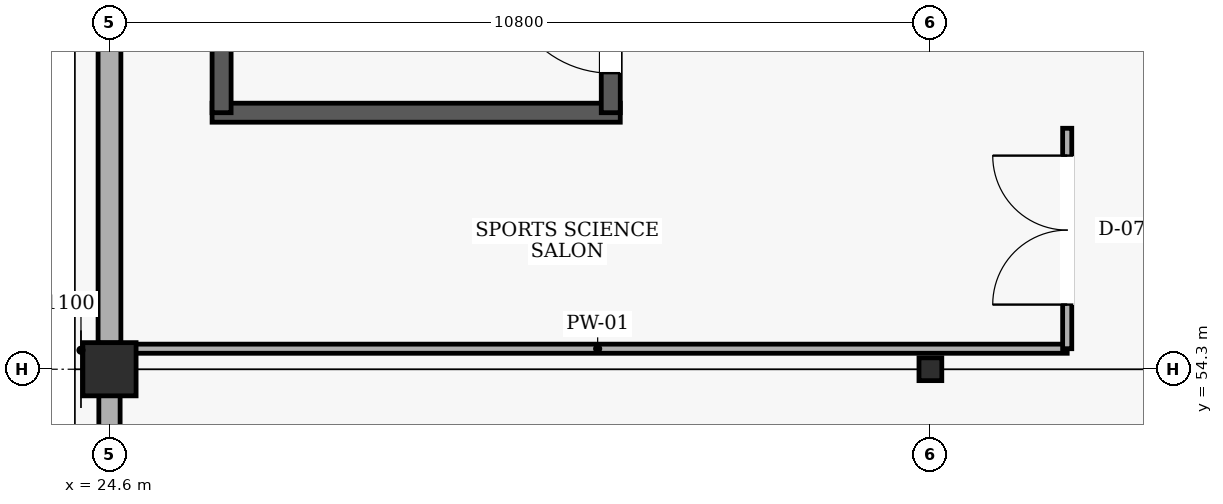
"""IFC4 building model, lengths in metres.
Left out: names, types, materials, properties, quantities, classifications, styles, units other than length and angle.
Written with IfcOpenShell. Run it as: python <this file> out.ifc"""

import sys

from ifc_helpers import new_model, si_unit, direction, frame, frame_2d, origin, origin_2d, place, context, subcontext, project, spatial, rectangle, hollow_rectangle, extrude, element, fill, save


model = new_model("IFC4")
c1 = context("Model", 3, precision=1e-05, world=origin(), true_north=direction((0.0, 1.0)))
c2 = subcontext(c1, "Body", "Model", "MODEL_VIEW")
j1 = project(units=[si_unit("LENGTHUNIT", "METRE"), si_unit("PLANEANGLEUNIT", "RADIAN")], contexts=[c1])
p1 = place(None, origin())
s1 = spatial("IfcSite", under=j1, at=p1, CompositionType="ELEMENT")
p2 = place(p1, origin())
s2 = spatial("IfcBuilding", under=s1, at=p2, CompositionType="ELEMENT")
p3 = place(p2, frame((0.0, 0.0, 24.6)))
s3 = spatial("IfcBuildingStorey", under=s2, at=p3, CompositionType="ELEMENT", Elevation=24.6)
p4 = place(p3, frame((24.6, 54.3, 0.0), z_axis=(0.0, 0.0, 1.0), x_axis=(1.0, 0.0, 0.0)))
e1 = element("IfcColumn", 1, at=p4, inside=s3, PredefinedType="COLUMN", context=c2, shape_type="SweptSolid", body=[
    extrude(rectangle(XDim=0.7, YDim=0.7, at=origin_2d()), origin(), (0.0, 0.0, 1.0), 4.8),
])
p5 = place(p3, frame((35.4, 54.3, 0.0), z_axis=(0.0, 0.0, 1.0), x_axis=(1.0, 0.0, 0.0)))
e2 = element("IfcColumn", 2, at=p5, inside=s3, PredefinedType="COLUMN", context=c2, shape_type="SweptSolid", body=[
    extrude(hollow_rectangle(XDim=0.3, YDim=0.3, WallThickness=0.016, at=origin_2d()), origin(), (0.0, 0.0, 1.0), 4.8),
])
p6 = place(p3, frame((24.6, 47.445, 0.0), z_axis=(0.0, 0.0, 1.0), x_axis=(0.0, 1.0, 0.0)))
e3 = element("IfcWall", 3, at=p6, inside=s3, PredefinedType="SOLIDWALL", context=c2, shape_type="SweptSolid", body=[
    extrude(rectangle(XDim=6.51, YDim=0.28, at=frame_2d((3.255, 0.0))), origin(), (0.0, 0.0, 1.0), 3.88),
])
p7 = place(p6, frame((2.255, 0.0, 0.9)))
e4 = element("IfcOpeningElement", 4, at=p7, cuts=e3, PredefinedType="OPENING", context=c2, shape_type="SweptSolid", body=[
    extrude(rectangle(XDim=2.0, YDim=1.5, at=frame_2d((1.0, 0.75))), frame((0.0, 0.15, 0.0), z_axis=(0.0, -1.0, 0.0), x_axis=(1.0, 0.0, 0.0)), (0.0, 0.0, 1.0), 0.3),
])
p8 = place(p3, frame((24.6, 54.645, 0.0), z_axis=(0.0, 0.0, 1.0), x_axis=(0.0, 1.0, 0.0)))
e5 = element("IfcWall", 5, at=p8, inside=s3, PredefinedType="SOLIDWALL", context=c2, shape_type="SweptSolid", body=[
    extrude(rectangle(XDim=13.71, YDim=0.3, at=frame_2d((6.855, 0.0))), origin(), (0.0, 0.0, 1.0), 3.58),
])
p9 = place(p8, frame((5.755, 0.0, 0.9)))
e6 = element("IfcOpeningElement", 6, at=p9, cuts=e5, PredefinedType="OPENING", context=c2, shape_type="SweptSolid", body=[
    extrude(rectangle(XDim=2.2, YDim=1.5, at=frame_2d((1.1, 0.75))), frame((0.0, 0.16, 0.0), z_axis=(0.0, -1.0, 0.0), x_axis=(1.0, 0.0, 0.0)), (0.0, 0.0, 1.0), 0.32),
])
p10 = place(p3, frame((25.95, 57.675, 0.0), z_axis=(0.0, 0.0, 1.0), x_axis=(1.0, 0.0, 0.0)))
e7 = element("IfcWall", 7, at=p10, inside=s3, PredefinedType="SHEAR", context=c2, shape_type="SweptSolid", body=[
    extrude(rectangle(XDim=5.37, YDim=0.25, at=frame_2d((2.685, 0.0))), origin(), (0.0, 0.0, 1.0), 4.5),
])
p11 = place(p3, frame((26.075, 57.675, 0.0), z_axis=(0.0, 0.0, 1.0), x_axis=(0.0, 1.0, 0.0)))
e8 = element("IfcWall", 8, at=p11, inside=s3, PredefinedType="SHEAR", context=c2, shape_type="SweptSolid", body=[
    extrude(rectangle(XDim=10.85, YDim=0.25, at=frame_2d((5.425, 0.0))), origin(), (0.0, 0.0, 1.0), 4.5),
])
p12 = place(p3, frame((31.195, 57.675, 0.0), z_axis=(0.0, 0.0, 1.0), x_axis=(0.0, 1.0, 0.0)))
e9 = element("IfcWall", 9, at=p12, inside=s3, PredefinedType="SHEAR", context=c2, shape_type="SweptSolid", body=[
    extrude(rectangle(XDim=10.85, YDim=0.25, at=frame_2d((5.425, 0.0))), origin(), (0.0, 0.0, 1.0), 4.5),
])
p13 = place(p12, frame((0.52, 0.0, 0.0)))
e10 = element("IfcOpeningElement", 10, at=p13, cuts=e9, PredefinedType="OPENING", context=c2, shape_type="SweptSolid", body=[
    extrude(rectangle(XDim=1.4, YDim=2.15, at=frame_2d((0.7, 1.075))), frame((0.0, 0.135, 0.0), z_axis=(0.0, -1.0, 0.0), x_axis=(1.0, 0.0, 0.0)), (0.0, 0.0, 1.0), 0.27),
])
p14 = place(p3, frame((24.845, 54.57, 0.0), z_axis=(0.0, 0.0, 1.0), x_axis=(1.0, 0.0, 0.0)))
e11 = element("IfcWall", 11, at=p14, inside=s3, PredefinedType="PARTITIONING", context=c2, shape_type="SweptSolid", body=[
    extrude(rectangle(XDim=12.355, YDim=0.12, at=frame_2d((6.177, 0.0))), origin(), (0.0, 0.0, 1.0), 3.78),
])
p15 = place(p3, frame((37.2, 54.57, 0.0), z_axis=(0.0, 0.0, 1.0), x_axis=(0.0, 1.0, 0.0)))
e12 = element("IfcWall", 12, at=p15, inside=s3, PredefinedType="PARTITIONING", context=c2, shape_type="SweptSolid", body=[
    extrude(rectangle(XDim=2.9, YDim=0.12, at=frame_2d((1.45, 0.0))), origin(), (0.0, 0.0, 1.0), 4.5),
])
p16 = place(p15, frame((0.58, 0.0, 0.0)))
e13 = element("IfcOpeningElement", 13, at=p16, cuts=e12, PredefinedType="OPENING", context=c2, shape_type="SweptSolid", body=[
    extrude(rectangle(XDim=1.96, YDim=2.3, at=frame_2d((0.98, 1.15))), frame((0.0, 0.07, 0.0), z_axis=(0.0, -1.0, 0.0), x_axis=(1.0, 0.0, 0.0)), (0.0, 0.0, 1.0), 0.14),
])
p17 = place(p13, origin())
e14 = element("IfcDoor", 14, at=p17, inside=s3, OperationType="SINGLE_SWING_RIGHT", PredefinedType="DOOR", context=c2, shape_type="SweptSolid", body=[
    extrude(rectangle(XDim=1.4, YDim=2.15, at=frame_2d((0.7, 1.075))), frame((0.0, 0.025, 0.0), z_axis=(0.0, -1.0, 0.0), x_axis=(1.0, 0.0, 0.0)), (0.0, 0.0, 1.0), 0.05),
])
fill(e10, e14)
p18 = place(p16, origin())
e15 = element("IfcDoor", 15, at=p18, inside=s3, OperationType="DOUBLE_DOOR_SINGLE_SWING", PredefinedType="DOOR", context=c2, shape_type="SweptSolid", body=[
    extrude(rectangle(XDim=1.96, YDim=2.3, at=frame_2d((0.98, 1.15))), frame((0.0, 0.025, 0.0), z_axis=(0.0, -1.0, 0.0), x_axis=(1.0, 0.0, 0.0)), (0.0, 0.0, 1.0), 0.05),
])
fill(e13, e15)
save(model, sys.argv[1])
